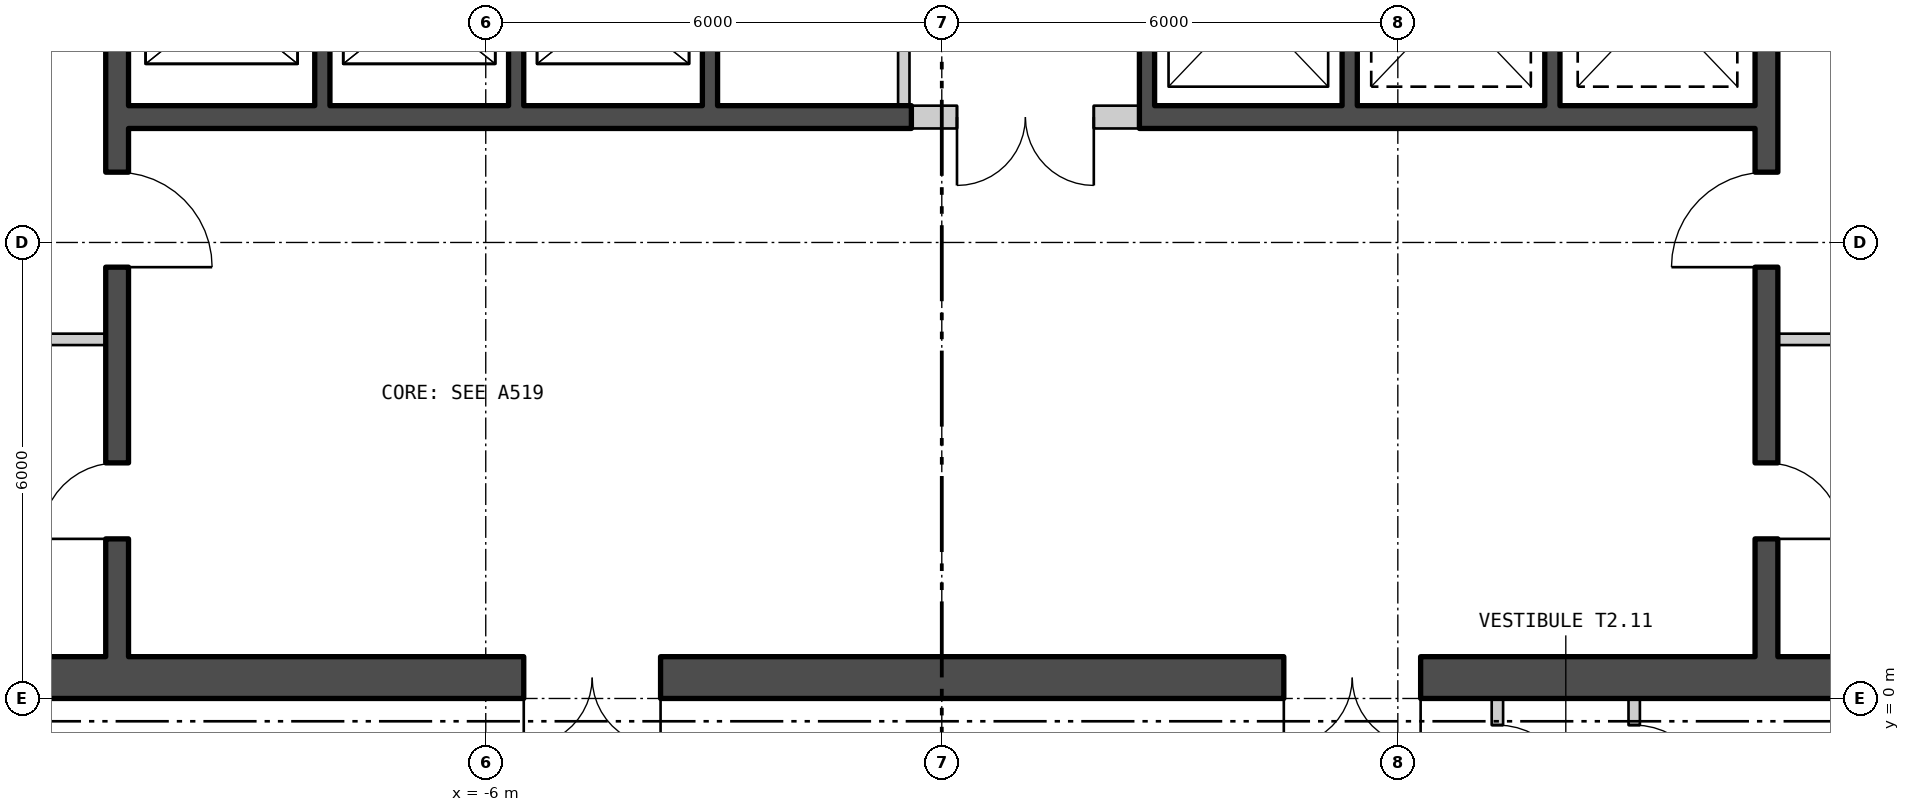
"""IFC4 building model, lengths in metres.
Left out: names, types, materials, properties, quantities, classifications, styles, units other than length and angle.
Written with IfcOpenShell. Run it as: python <this file> out.ifc"""

import sys

from ifc_helpers import new_model, si_unit, direction, frame, frame_2d, origin, place, context, subcontext, project, spatial, polyline, rectangle, outline, extrude, element, fill, save


model = new_model("IFC4")
c1 = context("Model", 3, precision=1e-05, world=origin(), true_north=direction((0.0, 1.0)))
c2 = subcontext(c1, "Body", "Model", "MODEL_VIEW")
j1 = project(units=[si_unit("LENGTHUNIT", "METRE"), si_unit("PLANEANGLEUNIT", "RADIAN")], contexts=[c1])
p1 = place(None, origin())
s1 = spatial("IfcSite", under=j1, at=p1, CompositionType="ELEMENT")
p2 = place(p1, origin())
s2 = spatial("IfcBuilding", under=s1, at=p2, CompositionType="ELEMENT")
p3 = place(p2, frame((0.0, 0.0, 133.8)))
s3 = spatial("IfcBuildingStorey", under=s2, at=p3, CompositionType="ELEMENT", Elevation=133.8)
p4 = place(p3, frame((-27.365, 12.198, -0.18), z_axis=(0.0, 0.0, 1.0), x_axis=(0.500000335318, -0.866025210188, 0.0)))
e1 = element("IfcWall", 1, at=p4, inside=s3, PredefinedType="SOLIDWALL", context=c2, shape_type="SweptSolid", body=[
    extrude(outline(polyline([(-0.13, -0.225), (45.88, -0.225), (45.62, 0.225), (0.13, 0.225), (-0.13, -0.225)])), origin(), (0.0, 0.0, 1.0), 6.0),
])
p5 = place(p4, frame((1.425, 0.0, 1.38)))
e2 = element("IfcOpeningElement", 2, at=p5, cuts=e1, PredefinedType="OPENING", context=c2, shape_type="SweptSolid", body=[
    extrude(rectangle(XDim=2.4, YDim=3.6, at=frame_2d((1.2, 1.8))), frame((0.0, 0.235, 0.0), z_axis=(0.0, -1.0, 0.0), x_axis=(1.0, 0.0, 0.0)), (0.0, 0.0, 1.0), 0.47),
])
p6 = place(p4, frame((5.895, 0.0, 1.38)))
e3 = element("IfcOpeningElement", 3, at=p6, cuts=e1, PredefinedType="OPENING", context=c2, shape_type="SweptSolid", body=[
    extrude(rectangle(XDim=2.4, YDim=3.6, at=frame_2d((1.2, 1.8))), frame((0.0, 0.235, 0.0), z_axis=(0.0, -1.0, 0.0), x_axis=(1.0, 0.0, 0.0)), (0.0, 0.0, 1.0), 0.47),
])
p7 = place(p4, frame((10.403, 0.0, 1.38)))
e4 = element("IfcOpeningElement", 4, at=p7, cuts=e1, PredefinedType="OPENING", context=c2, shape_type="SweptSolid", body=[
    extrude(rectangle(XDim=2.4, YDim=3.6, at=frame_2d((1.2, 1.8))), frame((0.0, 0.235, 0.0), z_axis=(0.0, -1.0, 0.0), x_axis=(1.0, 0.0, 0.0)), (0.0, 0.0, 1.0), 0.47),
])
p8 = place(p4, frame((14.912, 0.0, 1.38)))
e5 = element("IfcOpeningElement", 5, at=p8, cuts=e1, PredefinedType="OPENING", context=c2, shape_type="SweptSolid", body=[
    extrude(rectangle(XDim=2.4, YDim=3.6, at=frame_2d((1.2, 1.8))), frame((0.0, 0.235, 0.0), z_axis=(0.0, -1.0, 0.0), x_axis=(1.0, 0.0, 0.0)), (0.0, 0.0, 1.0), 0.47),
])
p9 = place(p4, frame((19.421, 0.0, 1.38)))
e6 = element("IfcOpeningElement", 6, at=p9, cuts=e1, PredefinedType="OPENING", context=c2, shape_type="SweptSolid", body=[
    extrude(rectangle(XDim=2.4, YDim=3.6, at=frame_2d((1.2, 1.8))), frame((0.0, 0.235, 0.0), z_axis=(0.0, -1.0, 0.0), x_axis=(1.0, 0.0, 0.0)), (0.0, 0.0, 1.0), 0.47),
])
p10 = place(p4, frame((23.929, 0.0, 1.38)))
e7 = element("IfcOpeningElement", 7, at=p10, cuts=e1, PredefinedType="OPENING", context=c2, shape_type="SweptSolid", body=[
    extrude(rectangle(XDim=2.4, YDim=3.6, at=frame_2d((1.2, 1.8))), frame((0.0, 0.235, 0.0), z_axis=(0.0, -1.0, 0.0), x_axis=(1.0, 0.0, 0.0)), (0.0, 0.0, 1.0), 0.47),
])
p11 = place(p4, frame((28.438, 0.0, 1.38)))
e8 = element("IfcOpeningElement", 8, at=p11, cuts=e1, PredefinedType="OPENING", context=c2, shape_type="SweptSolid", body=[
    extrude(rectangle(XDim=2.4, YDim=3.6, at=frame_2d((1.2, 1.8))), frame((0.0, 0.235, 0.0), z_axis=(0.0, -1.0, 0.0), x_axis=(1.0, 0.0, 0.0)), (0.0, 0.0, 1.0), 0.47),
])
p12 = place(p4, frame((32.947, 0.0, 1.38)))
e9 = element("IfcOpeningElement", 9, at=p12, cuts=e1, PredefinedType="OPENING", context=c2, shape_type="SweptSolid", body=[
    extrude(rectangle(XDim=2.4, YDim=3.6, at=frame_2d((1.2, 1.8))), frame((0.0, 0.235, 0.0), z_axis=(0.0, -1.0, 0.0), x_axis=(1.0, 0.0, 0.0)), (0.0, 0.0, 1.0), 0.47),
])
p13 = place(p4, frame((37.455, 0.0, 1.38)))
e10 = element("IfcOpeningElement", 10, at=p13, cuts=e1, PredefinedType="OPENING", context=c2, shape_type="SweptSolid", body=[
    extrude(rectangle(XDim=2.4, YDim=3.6, at=frame_2d((1.2, 1.8))), frame((0.0, 0.235, 0.0), z_axis=(0.0, -1.0, 0.0), x_axis=(1.0, 0.0, 0.0)), (0.0, 0.0, 1.0), 0.47),
])
p14 = place(p4, frame((41.925, 0.0, 1.38)))
e11 = element("IfcOpeningElement", 11, at=p14, cuts=e1, PredefinedType="OPENING", context=c2, shape_type="SweptSolid", body=[
    extrude(rectangle(XDim=2.4, YDim=3.6, at=frame_2d((1.2, 1.8))), frame((0.0, 0.235, 0.0), z_axis=(0.0, -1.0, 0.0), x_axis=(1.0, 0.0, 0.0)), (0.0, 0.0, 1.0), 0.47),
])
p15 = place(p3, frame((4.49, -27.423, -0.18), z_axis=(0.0, 0.0, 1.0), x_axis=(0.500000335318, 0.866025210188, 0.0)))
e12 = element("IfcWall", 12, at=p15, inside=s3, PredefinedType="SOLIDWALL", context=c2, shape_type="SweptSolid", body=[
    extrude(outline(polyline([(-0.13, -0.225), (45.88, -0.225), (45.62, 0.225), (0.13, 0.225), (-0.13, -0.225)])), origin(), (0.0, 0.0, 1.0), 6.0),
])
p16 = place(p15, frame((1.425, 0.0, 1.38)))
e13 = element("IfcOpeningElement", 13, at=p16, cuts=e12, PredefinedType="OPENING", context=c2, shape_type="SweptSolid", body=[
    extrude(rectangle(XDim=2.4, YDim=3.6, at=frame_2d((1.2, 1.8))), frame((0.0, 0.235, 0.0), z_axis=(0.0, -1.0, 0.0), x_axis=(1.0, 0.0, 0.0)), (0.0, 0.0, 1.0), 0.47),
])
p17 = place(p15, frame((5.895, 0.0, 1.38)))
e14 = element("IfcOpeningElement", 14, at=p17, cuts=e12, PredefinedType="OPENING", context=c2, shape_type="SweptSolid", body=[
    extrude(rectangle(XDim=2.4, YDim=3.6, at=frame_2d((1.2, 1.8))), frame((0.0, 0.235, 0.0), z_axis=(0.0, -1.0, 0.0), x_axis=(1.0, 0.0, 0.0)), (0.0, 0.0, 1.0), 0.47),
])
p18 = place(p15, frame((10.403, 0.0, 1.38)))
e15 = element("IfcOpeningElement", 15, at=p18, cuts=e12, PredefinedType="OPENING", context=c2, shape_type="SweptSolid", body=[
    extrude(rectangle(XDim=2.4, YDim=3.6, at=frame_2d((1.2, 1.8))), frame((0.0, 0.235, 0.0), z_axis=(0.0, -1.0, 0.0), x_axis=(1.0, 0.0, 0.0)), (0.0, 0.0, 1.0), 0.47),
])
p19 = place(p15, frame((14.912, 0.0, 1.38)))
e16 = element("IfcOpeningElement", 16, at=p19, cuts=e12, PredefinedType="OPENING", context=c2, shape_type="SweptSolid", body=[
    extrude(rectangle(XDim=2.4, YDim=3.6, at=frame_2d((1.2, 1.8))), frame((0.0, 0.235, 0.0), z_axis=(0.0, -1.0, 0.0), x_axis=(1.0, 0.0, 0.0)), (0.0, 0.0, 1.0), 0.47),
])
p20 = place(p15, frame((19.421, 0.0, 1.38)))
e17 = element("IfcOpeningElement", 17, at=p20, cuts=e12, PredefinedType="OPENING", context=c2, shape_type="SweptSolid", body=[
    extrude(rectangle(XDim=2.4, YDim=3.6, at=frame_2d((1.2, 1.8))), frame((0.0, 0.235, 0.0), z_axis=(0.0, -1.0, 0.0), x_axis=(1.0, 0.0, 0.0)), (0.0, 0.0, 1.0), 0.47),
])
p21 = place(p15, frame((23.929, 0.0, 1.38)))
e18 = element("IfcOpeningElement", 18, at=p21, cuts=e12, PredefinedType="OPENING", context=c2, shape_type="SweptSolid", body=[
    extrude(rectangle(XDim=2.4, YDim=3.6, at=frame_2d((1.2, 1.8))), frame((0.0, 0.235, 0.0), z_axis=(0.0, -1.0, 0.0), x_axis=(1.0, 0.0, 0.0)), (0.0, 0.0, 1.0), 0.47),
])
p22 = place(p15, frame((28.438, 0.0, 1.38)))
e19 = element("IfcOpeningElement", 19, at=p22, cuts=e12, PredefinedType="OPENING", context=c2, shape_type="SweptSolid", body=[
    extrude(rectangle(XDim=2.4, YDim=3.6, at=frame_2d((1.2, 1.8))), frame((0.0, 0.235, 0.0), z_axis=(0.0, -1.0, 0.0), x_axis=(1.0, 0.0, 0.0)), (0.0, 0.0, 1.0), 0.47),
])
p23 = place(p15, frame((32.947, 0.0, 1.38)))
e20 = element("IfcOpeningElement", 20, at=p23, cuts=e12, PredefinedType="OPENING", context=c2, shape_type="SweptSolid", body=[
    extrude(rectangle(XDim=2.4, YDim=3.6, at=frame_2d((1.2, 1.8))), frame((0.0, 0.235, 0.0), z_axis=(0.0, -1.0, 0.0), x_axis=(1.0, 0.0, 0.0)), (0.0, 0.0, 1.0), 0.47),
])
p24 = place(p15, frame((37.455, 0.0, 1.38)))
e21 = element("IfcOpeningElement", 21, at=p24, cuts=e12, PredefinedType="OPENING", context=c2, shape_type="SweptSolid", body=[
    extrude(rectangle(XDim=2.4, YDim=3.6, at=frame_2d((1.2, 1.8))), frame((0.0, 0.235, 0.0), z_axis=(0.0, -1.0, 0.0), x_axis=(1.0, 0.0, 0.0)), (0.0, 0.0, 1.0), 0.47),
])
p25 = place(p15, frame((41.925, 0.0, 1.38)))
e22 = element("IfcOpeningElement", 22, at=p25, cuts=e12, PredefinedType="OPENING", context=c2, shape_type="SweptSolid", body=[
    extrude(rectangle(XDim=2.4, YDim=3.6, at=frame_2d((1.2, 1.8))), frame((0.0, 0.235, 0.0), z_axis=(0.0, -1.0, 0.0), x_axis=(1.0, 0.0, 0.0)), (0.0, 0.0, 1.0), 0.47),
])
p26 = place(p3, frame((-17.5, 0.275, 0.0), z_axis=(0.0, 0.0, 1.0), x_axis=(1.0, 0.0, 0.0)))
e23 = element("IfcWall", 23, at=p26, inside=s3, PredefinedType="SHEAR", context=c2, shape_type="SweptSolid", body=[
    extrude(rectangle(XDim=35.0, YDim=0.55, at=frame_2d((17.5, 0.0))), origin(), (0.0, 0.0, 1.0), 5.8),
])
p27 = place(p26, frame((12.0, 0.0, 0.0)))
e24 = element("IfcOpeningElement", 24, at=p27, cuts=e23, PredefinedType="OPENING", context=c2, shape_type="SweptSolid", body=[
    extrude(rectangle(XDim=1.8, YDim=2.4, at=frame_2d((0.9, 1.2))), frame((0.0, 0.285, 0.0), z_axis=(0.0, -1.0, 0.0), x_axis=(1.0, 0.0, 0.0)), (0.0, 0.0, 1.0), 0.57),
])
p28 = place(p26, frame((22.0, 0.0, 0.0)))
e25 = element("IfcOpeningElement", 25, at=p28, cuts=e23, PredefinedType="OPENING", context=c2, shape_type="SweptSolid", body=[
    extrude(rectangle(XDim=1.8, YDim=2.4, at=frame_2d((0.9, 1.2))), frame((0.0, 0.285, 0.0), z_axis=(0.0, -1.0, 0.0), x_axis=(1.0, 0.0, 0.0)), (0.0, 0.0, 1.0), 0.57),
])
p29 = place(p3, frame((-10.85, 0.55, 0.0), z_axis=(0.0, 0.0, 1.0), x_axis=(0.0, 1.0, 0.0)))
e26 = element("IfcWall", 26, at=p29, inside=s3, PredefinedType="SHEAR", context=c2, shape_type="SweptSolid", body=[
    extrude(rectangle(XDim=16.9, YDim=0.3, at=frame_2d((8.45, 0.0))), origin(), (0.0, 0.0, 1.0), 5.8),
])
p30 = place(p29, frame((5.125, 0.0, 0.0)))
e27 = element("IfcOpeningElement", 27, at=p30, cuts=e26, PredefinedType="OPENING", context=c2, shape_type="SweptSolid", body=[
    extrude(rectangle(XDim=1.25, YDim=2.1, at=frame_2d((0.625, 1.05))), frame((0.0, 0.16, 0.0), z_axis=(0.0, -1.0, 0.0), x_axis=(1.0, 0.0, 0.0)), (0.0, 0.0, 1.0), 0.32),
])
p31 = place(p29, frame((1.55, 0.0, 0.0)))
e28 = element("IfcOpeningElement", 28, at=p31, cuts=e26, PredefinedType="OPENING", context=c2, shape_type="SweptSolid", body=[
    extrude(rectangle(XDim=1.0, YDim=2.1, at=frame_2d((0.5, 1.05))), frame((0.0, 0.16, 0.0), z_axis=(0.0, -1.0, 0.0), x_axis=(1.0, 0.0, 0.0)), (0.0, 0.0, 1.0), 0.32),
])
p32 = place(p3, frame((10.85, 0.55, 0.0), z_axis=(0.0, 0.0, 1.0), x_axis=(0.0, 1.0, 0.0)))
e29 = element("IfcWall", 29, at=p32, inside=s3, PredefinedType="SHEAR", context=c2, shape_type="SweptSolid", body=[
    extrude(rectangle(XDim=16.9, YDim=0.3, at=frame_2d((8.45, 0.0))), origin(), (0.0, 0.0, 1.0), 5.8),
])
p33 = place(p32, frame((5.125, 0.0, 0.0)))
e30 = element("IfcOpeningElement", 30, at=p33, cuts=e29, PredefinedType="OPENING", context=c2, shape_type="SweptSolid", body=[
    extrude(rectangle(XDim=1.25, YDim=2.1, at=frame_2d((0.625, 1.05))), frame((0.0, 0.16, 0.0), z_axis=(0.0, -1.0, 0.0), x_axis=(1.0, 0.0, 0.0)), (0.0, 0.0, 1.0), 0.32),
])
p34 = place(p32, frame((1.55, 0.0, 0.0)))
e31 = element("IfcOpeningElement", 31, at=p34, cuts=e29, PredefinedType="OPENING", context=c2, shape_type="SweptSolid", body=[
    extrude(rectangle(XDim=1.0, YDim=2.1, at=frame_2d((0.5, 1.05))), frame((0.0, 0.16, 0.0), z_axis=(0.0, -1.0, 0.0), x_axis=(1.0, 0.0, 0.0)), (0.0, 0.0, 1.0), 0.32),
])
p35 = place(p3, frame((-10.7, 7.65, 0.0), z_axis=(0.0, 0.0, 1.0), x_axis=(1.0, 0.0, 0.0)))
e32 = element("IfcWall", 32, at=p35, inside=s3, PredefinedType="SHEAR", context=c2, shape_type="SweptSolid", body=[
    extrude(rectangle(XDim=10.3, YDim=0.3, at=frame_2d((5.15, 0.0))), origin(), (0.0, 0.0, 1.0), 5.8),
])
p36 = place(p3, frame((2.6, 7.65, 0.0), z_axis=(0.0, 0.0, 1.0), x_axis=(1.0, 0.0, 0.0)))
e33 = element("IfcWall", 33, at=p36, inside=s3, PredefinedType="SHEAR", context=c2, shape_type="SweptSolid", body=[
    extrude(rectangle(XDim=8.1, YDim=0.3, at=frame_2d((4.05, 0.0))), origin(), (0.0, 0.0, 1.0), 5.8),
])
for number, where, z_axis, x_axis in (
    (34, (-8.15, 7.8, 0.0), (0.0, 0.0, 1.0), (0.0, 1.0, 0.0)),
    (35, (-5.6, 7.8, 0.0), (0.0, 0.0, 1.0), (0.0, 1.0, 0.0)),
    (36, (-3.05, 7.8, 0.0), (0.0, 0.0, 1.0), (0.0, 1.0, 0.0)),
):
    element("IfcWall", number, at=place(p3, frame(where, z_axis=z_axis, x_axis=x_axis)), inside=s3, PredefinedType="SHEAR", context=c2, shape_type="SweptSolid", body=[
        extrude(rectangle(XDim=2.7, YDim=0.2, at=frame_2d((1.35, 0.0))), origin(), (0.0, 0.0, 1.0), 5.8),
    ])
p37 = place(p3, frame((-0.5, 7.8, 0.0), z_axis=(0.0, 0.0, 1.0), x_axis=(0.0, 1.0, 0.0)))
e37 = element("IfcWall", 37, at=p37, inside=s3, PredefinedType="PARTITIONING", context=c2, shape_type="SweptSolid", body=[
    extrude(rectangle(XDim=2.7, YDim=0.15, at=frame_2d((1.35, 0.0))), origin(), (0.0, 0.0, 1.0), 5.8),
])
for number, where, z_axis, x_axis in (
    (38, (2.7, 7.8, 0.0), (0.0, 0.0, 1.0), (0.0, 1.0, 0.0)),
    (39, (5.367, 7.8, 0.0), (0.0, 0.0, 1.0), (0.0, 1.0, 0.0)),
    (40, (8.033, 7.8, 0.0), (0.0, 0.0, 1.0), (0.0, 1.0, 0.0)),
):
    element("IfcWall", number, at=place(p3, frame(where, z_axis=z_axis, x_axis=x_axis)), inside=s3, PredefinedType="SHEAR", context=c2, shape_type="SweptSolid", body=[
        extrude(rectangle(XDim=2.7, YDim=0.2, at=frame_2d((1.35, 0.0))), origin(), (0.0, 0.0, 1.0), 5.8),
    ])
for number, where, z_axis, x_axis in (
    (41, (-14.2, 4.725, 0.0), (0.0, 0.0, 1.0), (1.0, 0.0, 0.0)),
    (42, (11.0, 4.725, 0.0), (0.0, 0.0, 1.0), (1.0, 0.0, 0.0)),
):
    element("IfcWall", number, at=place(p3, frame(where, z_axis=z_axis, x_axis=x_axis)), inside=s3, PredefinedType="PARTITIONING", context=c2, shape_type="SweptSolid", body=[
        extrude(rectangle(XDim=3.2, YDim=0.15, at=frame_2d((1.6, 0.0))), origin(), (0.0, 0.0, 1.0), 5.8),
    ])
p38 = place(p3, frame((-0.4, 7.65, 0.0), z_axis=(0.0, 0.0, 1.0), x_axis=(1.0, 0.0, 0.0)))
e43 = element("IfcWall", 43, at=p38, inside=s3, PredefinedType="PARTITIONING", context=c2, shape_type="SweptSolid", body=[
    extrude(rectangle(XDim=3.0, YDim=0.3, at=frame_2d((1.5, 0.0))), origin(), (0.0, 0.0, 1.0), 5.8),
])
p39 = place(p38, frame((0.6, 0.0, 0.0)))
e44 = element("IfcOpeningElement", 44, at=p39, cuts=e43, PredefinedType="OPENING", context=c2, shape_type="SweptSolid", body=[
    extrude(rectangle(XDim=1.8, YDim=2.4, at=frame_2d((0.9, 1.2))), frame((0.0, 0.16, 0.0), z_axis=(0.0, -1.0, 0.0), x_axis=(1.0, 0.0, 0.0)), (0.0, 0.0, 1.0), 0.32),
])
p40 = place(p3, frame((7.31, -1.699, 0.0), z_axis=(0.0, 0.0, 1.0), x_axis=(0.0, 1.0, 0.0)))
e45 = element("IfcWall", 45, at=p40, inside=s3, PredefinedType="PARTITIONING", context=c2, shape_type="SweptSolid", body=[
    extrude(rectangle(XDim=1.698, YDim=0.15, at=frame_2d((0.849, 0.0))), origin(), (0.0, 0.0, 1.0), 5.8),
])
p41 = place(p40, frame((0.349, 0.0, 0.0)))
e46 = element("IfcOpeningElement", 46, at=p41, cuts=e45, PredefinedType="OPENING", context=c2, shape_type="SweptSolid", body=[
    extrude(rectangle(XDim=1.0, YDim=2.1, at=frame_2d((0.5, 1.05))), frame((0.0, 0.085, 0.0), z_axis=(0.0, -1.0, 0.0), x_axis=(1.0, 0.0, 0.0)), (0.0, 0.0, 1.0), 0.17),
])
p42 = place(p3, frame((9.11, -1.699, 0.0), z_axis=(0.0, 0.0, 1.0), x_axis=(0.0, 1.0, 0.0)))
e47 = element("IfcWall", 47, at=p42, inside=s3, PredefinedType="PARTITIONING", context=c2, shape_type="SweptSolid", body=[
    extrude(rectangle(XDim=1.698, YDim=0.15, at=frame_2d((0.849, 0.0))), origin(), (0.0, 0.0, 1.0), 5.8),
])
p43 = place(p42, frame((0.349, 0.0, 0.0)))
e48 = element("IfcOpeningElement", 48, at=p43, cuts=e47, PredefinedType="OPENING", context=c2, shape_type="SweptSolid", body=[
    extrude(rectangle(XDim=1.0, YDim=2.1, at=frame_2d((0.5, 1.05))), frame((0.0, 0.085, 0.0), z_axis=(0.0, -1.0, 0.0), x_axis=(1.0, 0.0, 0.0)), (0.0, 0.0, 1.0), 0.17),
])
p44 = place(p30, origin())
e49 = element("IfcDoor", 49, at=p44, inside=s3, OperationType="SINGLE_SWING_LEFT", PredefinedType="DOOR", context=c2, shape_type="SweptSolid", body=[
    extrude(rectangle(XDim=1.25, YDim=2.1, at=frame_2d((0.625, 1.05))), frame((0.0, 0.025, 0.0), z_axis=(0.0, -1.0, 0.0), x_axis=(1.0, 0.0, 0.0)), (0.0, 0.0, 1.0), 0.05),
])
fill(e27, e49)
p45 = place(p31, origin())
e50 = element("IfcDoor", 50, at=p45, inside=s3, OperationType="SINGLE_SWING_RIGHT", PredefinedType="DOOR", context=c2, shape_type="SweptSolid", body=[
    extrude(rectangle(XDim=1.0, YDim=2.1, at=frame_2d((0.5, 1.05))), frame((0.0, 0.025, 0.0), z_axis=(0.0, -1.0, 0.0), x_axis=(1.0, 0.0, 0.0)), (0.0, 0.0, 1.0), 0.05),
])
fill(e28, e50)
p46 = place(p33, origin())
e51 = element("IfcDoor", 51, at=p46, inside=s3, OperationType="SINGLE_SWING_RIGHT", PredefinedType="DOOR", context=c2, shape_type="SweptSolid", body=[
    extrude(rectangle(XDim=1.25, YDim=2.1, at=frame_2d((0.625, 1.05))), frame((0.0, 0.025, 0.0), z_axis=(0.0, -1.0, 0.0), x_axis=(1.0, 0.0, 0.0)), (0.0, 0.0, 1.0), 0.05),
])
fill(e30, e51)
p47 = place(p34, origin())
e52 = element("IfcDoor", 52, at=p47, inside=s3, OperationType="SINGLE_SWING_LEFT", PredefinedType="DOOR", context=c2, shape_type="SweptSolid", body=[
    extrude(rectangle(XDim=1.0, YDim=2.1, at=frame_2d((0.5, 1.05))), frame((0.0, 0.025, 0.0), z_axis=(0.0, -1.0, 0.0), x_axis=(1.0, 0.0, 0.0)), (0.0, 0.0, 1.0), 0.05),
])
fill(e31, e52)
p48 = place(p39, origin())
e53 = element("IfcDoor", 53, at=p48, inside=s3, OperationType="DOUBLE_DOOR_SINGLE_SWING", PredefinedType="DOOR", context=c2, shape_type="SweptSolid", body=[
    extrude(rectangle(XDim=1.8, YDim=2.4, at=frame_2d((0.9, 1.2))), frame((0.0, 0.025, 0.0), z_axis=(0.0, -1.0, 0.0), x_axis=(1.0, 0.0, 0.0)), (0.0, 0.0, 1.0), 0.05),
])
fill(e44, e53)
p49 = place(p27, origin())
e54 = element("IfcDoor", 54, at=p49, inside=s3, OperationType="DOUBLE_DOOR_SINGLE_SWING", PredefinedType="DOOR", context=c2, shape_type="SweptSolid", body=[
    extrude(rectangle(XDim=1.8, YDim=2.4, at=frame_2d((0.9, 1.2))), frame((0.0, 0.025, 0.0), z_axis=(0.0, -1.0, 0.0), x_axis=(1.0, 0.0, 0.0)), (0.0, 0.0, 1.0), 0.05),
])
fill(e24, e54)
p50 = place(p28, origin())
e55 = element("IfcDoor", 55, at=p50, inside=s3, OperationType="DOUBLE_DOOR_SINGLE_SWING", PredefinedType="DOOR", context=c2, shape_type="SweptSolid", body=[
    extrude(rectangle(XDim=1.8, YDim=2.4, at=frame_2d((0.9, 1.2))), frame((0.0, 0.025, 0.0), z_axis=(0.0, -1.0, 0.0), x_axis=(1.0, 0.0, 0.0)), (0.0, 0.0, 1.0), 0.05),
])
fill(e25, e55)
p51 = place(p41, origin())
e56 = element("IfcDoor", 56, at=p51, inside=s3, OperationType="SINGLE_SWING_LEFT", PredefinedType="DOOR", context=c2, shape_type="SweptSolid", body=[
    extrude(rectangle(XDim=1.0, YDim=2.1, at=frame_2d((0.5, 1.05))), frame((0.0, 0.025, 0.0), z_axis=(0.0, -1.0, 0.0), x_axis=(1.0, 0.0, 0.0)), (0.0, 0.0, 1.0), 0.05),
])
fill(e46, e56)
p52 = place(p43, origin())
e57 = element("IfcDoor", 57, at=p52, inside=s3, OperationType="SINGLE_SWING_LEFT", PredefinedType="DOOR", context=c2, shape_type="SweptSolid", body=[
    extrude(rectangle(XDim=1.0, YDim=2.1, at=frame_2d((0.5, 1.05))), frame((0.0, 0.025, 0.0), z_axis=(0.0, -1.0, 0.0), x_axis=(1.0, 0.0, 0.0)), (0.0, 0.0, 1.0), 0.05),
])
fill(e48, e57)
save(model, sys.argv[1])
